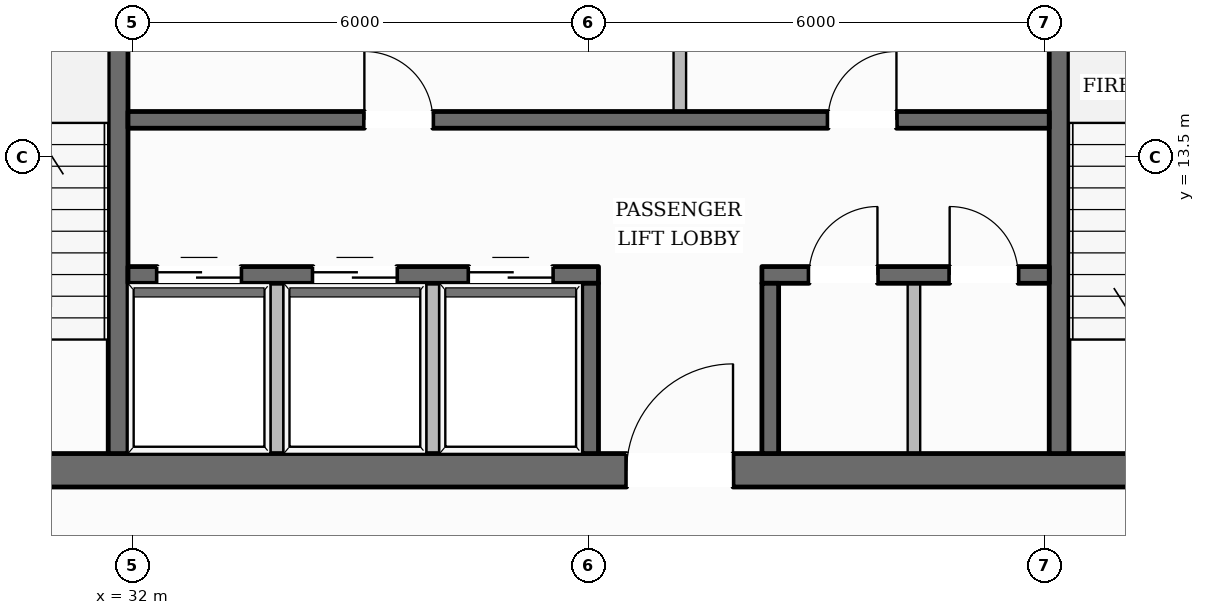
"""IFC4 building model, lengths in metres.
Left out: names, types, materials, properties, quantities, classifications, styles, units other than length and angle.
Written with IfcOpenShell. Run it as: python <this file> out.ifc"""

import sys

from ifc_helpers import new_model, si_unit, direction, frame, frame_2d, origin, place, context, subcontext, project, spatial, rectangle, extrude, element, fill, save


model = new_model("IFC4")
c1 = context("Model", 3, precision=1e-05, world=origin(), true_north=direction((0.0, 1.0)))
c2 = subcontext(c1, "Body", "Model", "MODEL_VIEW")
j1 = project(units=[si_unit("LENGTHUNIT", "METRE"), si_unit("PLANEANGLEUNIT", "RADIAN")], contexts=[c1])
p1 = place(None, origin())
s1 = spatial("IfcSite", under=j1, at=p1, CompositionType="ELEMENT")
p2 = place(p1, origin())
s2 = spatial("IfcBuilding", under=s1, at=p2, CompositionType="ELEMENT")
p3 = place(p2, frame((0.0, 0.0, 211.2)))
s3 = spatial("IfcBuildingStorey", under=s2, at=p3, CompositionType="ELEMENT", Elevation=211.2)
p4 = place(p3, frame((28.04, 9.38, 0.0), z_axis=(0.0, 0.0, 1.0), x_axis=(1.0, 0.0, 0.0)))
e1 = element("IfcWall", 1, at=p4, inside=s3, PredefinedType="SOLIDWALL", context=c2, shape_type="SweptSolid", body=[
    extrude(rectangle(XDim=19.92, YDim=0.44, at=frame_2d((9.96, 0.0))), origin(), (0.0, 0.0, 1.0), 3.6),
])
p5 = place(p4, frame((10.46, 0.0, 0.0)))
e2 = element("IfcOpeningElement", 2, at=p5, cuts=e1, PredefinedType="OPENING", context=c2, shape_type="SweptSolid", body=[
    extrude(rectangle(XDim=1.4, YDim=2.2, at=frame_2d((0.7, 1.1))), frame((0.0, 0.23, 0.0), z_axis=(0.0, -1.0, 0.0), x_axis=(1.0, 0.0, 0.0)), (0.0, 0.0, 1.0), 0.46),
])
p6 = place(p3, frame((31.81, 9.6, 0.0), z_axis=(0.0, 0.0, 1.0), x_axis=(0.0, 1.0, 0.0)))
e3 = element("IfcWall", 3, at=p6, inside=s3, PredefinedType="SHEAR", context=c2, shape_type="SweptSolid", body=[
    extrude(rectangle(XDim=13.0, YDim=0.26, at=frame_2d((6.5, 0.0))), origin(), (0.0, 0.0, 1.0), 3.6),
])
p7 = place(p6, frame((10.925, 0.0, 0.0)))
e4 = element("IfcOpeningElement", 4, at=p7, cuts=e3, PredefinedType="OPENING", context=c2, shape_type="SweptSolid", body=[
    extrude(rectangle(XDim=1.25, YDim=2.25, at=frame_2d((0.625, 1.125))), frame((0.0, 0.14, 0.0), z_axis=(0.0, -1.0, 0.0), x_axis=(1.0, 0.0, 0.0)), (0.0, 0.0, 1.0), 0.28),
])
p8 = place(p3, frame((44.19, 9.6, 0.0), z_axis=(0.0, 0.0, 1.0), x_axis=(0.0, 1.0, 0.0)))
e5 = element("IfcWall", 5, at=p8, inside=s3, PredefinedType="SHEAR", context=c2, shape_type="SweptSolid", body=[
    extrude(rectangle(XDim=13.0, YDim=0.26, at=frame_2d((6.5, 0.0))), origin(), (0.0, 0.0, 1.0), 3.6),
])
p9 = place(p8, frame((10.925, 0.0, 0.0)))
e6 = element("IfcOpeningElement", 6, at=p9, cuts=e5, PredefinedType="OPENING", context=c2, shape_type="SweptSolid", body=[
    extrude(rectangle(XDim=1.25, YDim=2.25, at=frame_2d((0.625, 1.125))), frame((0.0, 0.14, 0.0), z_axis=(0.0, -1.0, 0.0), x_axis=(1.0, 0.0, 0.0)), (0.0, 0.0, 1.0), 0.28),
])
p10 = place(p3, frame((31.94, 13.99, 0.0), z_axis=(0.0, 0.0, 1.0), x_axis=(1.0, 0.0, 0.0)))
e7 = element("IfcWall", 7, at=p10, inside=s3, PredefinedType="SOLIDWALL", context=c2, shape_type="SweptSolid", body=[
    extrude(rectangle(XDim=12.12, YDim=0.22, at=frame_2d((6.06, 0.0))), origin(), (0.0, 0.0, 1.0), 3.6),
])
p11 = place(p10, frame((3.11, 0.0, 0.0)))
e8 = element("IfcOpeningElement", 8, at=p11, cuts=e7, PredefinedType="OPENING", context=c2, shape_type="SweptSolid", body=[
    extrude(rectangle(XDim=0.9, YDim=2.1, at=frame_2d((0.45, 1.05))), frame((0.0, 0.12, 0.0), z_axis=(0.0, -1.0, 0.0), x_axis=(1.0, 0.0, 0.0)), (0.0, 0.0, 1.0), 0.24),
])
p12 = place(p10, frame((9.21, 0.0, 0.0)))
e9 = element("IfcOpeningElement", 9, at=p12, cuts=e7, PredefinedType="OPENING", context=c2, shape_type="SweptSolid", body=[
    extrude(rectangle(XDim=0.9, YDim=2.1, at=frame_2d((0.45, 1.05))), frame((0.0, 0.12, 0.0), z_axis=(0.0, -1.0, 0.0), x_axis=(1.0, 0.0, 0.0)), (0.0, 0.0, 1.0), 0.24),
])
p13 = place(p3, frame((31.94, 11.95, 0.0), z_axis=(0.0, 0.0, 1.0), x_axis=(1.0, 0.0, 0.0)))
e10 = element("IfcWall", 10, at=p13, inside=s3, PredefinedType="SOLIDWALL", context=c2, shape_type="SweptSolid", body=[
    extrude(rectangle(XDim=6.19, YDim=0.22, at=frame_2d((3.095, 0.0))), origin(), (0.0, 0.0, 1.0), 3.6),
])
p14 = place(p13, frame((0.385, 0.0, 0.0)))
e11 = element("IfcOpeningElement", 11, at=p14, cuts=e10, PredefinedType="OPENING", context=c2, shape_type="SweptSolid", body=[
    extrude(rectangle(XDim=1.1, YDim=2.2, at=frame_2d((0.55, 1.1))), frame((0.0, 0.12, 0.0), z_axis=(0.0, -1.0, 0.0), x_axis=(1.0, 0.0, 0.0)), (0.0, 0.0, 1.0), 0.24),
])
p15 = place(p13, frame((2.435, 0.0, 0.0)))
e12 = element("IfcOpeningElement", 12, at=p15, cuts=e10, PredefinedType="OPENING", context=c2, shape_type="SweptSolid", body=[
    extrude(rectangle(XDim=1.1, YDim=2.2, at=frame_2d((0.55, 1.1))), frame((0.0, 0.12, 0.0), z_axis=(0.0, -1.0, 0.0), x_axis=(1.0, 0.0, 0.0)), (0.0, 0.0, 1.0), 0.24),
])
p16 = place(p13, frame((4.485, 0.0, 0.0)))
e13 = element("IfcOpeningElement", 13, at=p16, cuts=e10, PredefinedType="OPENING", context=c2, shape_type="SweptSolid", body=[
    extrude(rectangle(XDim=1.1, YDim=2.2, at=frame_2d((0.55, 1.1))), frame((0.0, 0.12, 0.0), z_axis=(0.0, -1.0, 0.0), x_axis=(1.0, 0.0, 0.0)), (0.0, 0.0, 1.0), 0.24),
])
p17 = place(p3, frame((40.28, 11.95, 0.0), z_axis=(0.0, 0.0, 1.0), x_axis=(1.0, 0.0, 0.0)))
e14 = element("IfcWall", 14, at=p17, inside=s3, PredefinedType="SOLIDWALL", context=c2, shape_type="SweptSolid", body=[
    extrude(rectangle(XDim=3.78, YDim=0.22, at=frame_2d((1.89, 0.0))), origin(), (0.0, 0.0, 1.0), 3.6),
])
p18 = place(p17, frame((0.62, 0.0, 0.0)))
e15 = element("IfcOpeningElement", 15, at=p18, cuts=e14, PredefinedType="OPENING", context=c2, shape_type="SweptSolid", body=[
    extrude(rectangle(XDim=0.9, YDim=2.1, at=frame_2d((0.45, 1.05))), frame((0.0, 0.12, 0.0), z_axis=(0.0, -1.0, 0.0), x_axis=(1.0, 0.0, 0.0)), (0.0, 0.0, 1.0), 0.24),
])
p19 = place(p17, frame((2.47, 0.0, 0.0)))
e16 = element("IfcOpeningElement", 16, at=p19, cuts=e14, PredefinedType="OPENING", context=c2, shape_type="SweptSolid", body=[
    extrude(rectangle(XDim=0.9, YDim=2.1, at=frame_2d((0.45, 1.05))), frame((0.0, 0.12, 0.0), z_axis=(0.0, -1.0, 0.0), x_axis=(1.0, 0.0, 0.0)), (0.0, 0.0, 1.0), 0.24),
])
for number, where, z_axis, x_axis in (
    (17, (38.02, 9.6, 0.0), (0.0, 0.0, 1.0), (0.0, 1.0, 0.0)),
    (18, (40.39, 9.6, 0.0), (0.0, 0.0, 1.0), (0.0, 1.0, 0.0)),
):
    element("IfcWall", number, at=place(p3, frame(where, z_axis=z_axis, x_axis=x_axis)), inside=s3, PredefinedType="SOLIDWALL", context=c2, shape_type="SweptSolid", body=[
        extrude(rectangle(XDim=2.24, YDim=0.22, at=frame_2d((1.12, 0.0))), origin(), (0.0, 0.0, 1.0), 3.6),
    ])
p20 = place(p3, frame((14.16, 10.888, 0.0), z_axis=(0.0, 0.0, 1.0), x_axis=(0.508058913236, 0.861322321017, 0.0)))
e19 = element("IfcWall", 19, at=p20, inside=s3, PredefinedType="STANDARD", context=c2, shape_type="SweptSolid", body=[
    extrude(rectangle(XDim=38.718, YDim=0.35, at=frame_2d((19.359, 0.0))), origin(), (0.0, 0.0, 1.0), 3.132),
])
p21 = place(p20, frame((34.374, 0.0, 0.65)))
e20 = element("IfcOpeningElement", 20, at=p21, cuts=e19, PredefinedType="OPENING", context=c2, shape_type="SweptSolid", body=[
    extrude(rectangle(XDim=1.45, YDim=1.75, at=frame_2d((0.725, 0.875))), frame((0.0, 0.185, 0.0), z_axis=(0.0, -1.0, 0.0), x_axis=(1.0, 0.0, 0.0)), (0.0, 0.0, 1.0), 0.37),
])
p22 = place(p20, frame((28.08, 0.0, 0.65)))
e21 = element("IfcOpeningElement", 21, at=p22, cuts=e19, PredefinedType="OPENING", context=c2, shape_type="SweptSolid", body=[
    extrude(rectangle(XDim=1.45, YDim=1.75, at=frame_2d((0.725, 0.875))), frame((0.0, 0.185, 0.0), z_axis=(0.0, -1.0, 0.0), x_axis=(1.0, 0.0, 0.0)), (0.0, 0.0, 1.0), 0.37),
])
p23 = place(p20, frame((15.491, 0.0, 0.65)))
e22 = element("IfcOpeningElement", 22, at=p23, cuts=e19, PredefinedType="OPENING", context=c2, shape_type="SweptSolid", body=[
    extrude(rectangle(XDim=1.45, YDim=1.75, at=frame_2d((0.725, 0.875))), frame((0.0, 0.185, 0.0), z_axis=(0.0, -1.0, 0.0), x_axis=(1.0, 0.0, 0.0)), (0.0, 0.0, 1.0), 0.37),
])
p24 = place(p20, frame((9.197, 0.0, 0.65)))
e23 = element("IfcOpeningElement", 23, at=p24, cuts=e19, PredefinedType="OPENING", context=c2, shape_type="SweptSolid", body=[
    extrude(rectangle(XDim=1.45, YDim=1.75, at=frame_2d((0.725, 0.875))), frame((0.0, 0.185, 0.0), z_axis=(0.0, -1.0, 0.0), x_axis=(1.0, 0.0, 0.0)), (0.0, 0.0, 1.0), 0.37),
])
p25 = place(p20, frame((2.903, 0.0, 0.65)))
e24 = element("IfcOpeningElement", 24, at=p25, cuts=e19, PredefinedType="OPENING", context=c2, shape_type="SweptSolid", body=[
    extrude(rectangle(XDim=1.45, YDim=1.75, at=frame_2d((0.725, 0.875))), frame((0.0, 0.185, 0.0), z_axis=(0.0, -1.0, 0.0), x_axis=(1.0, 0.0, 0.0)), (0.0, 0.0, 1.0), 0.37),
])
p26 = place(p3, frame((42.066, 44.299, 0.0), z_axis=(0.0, 0.0, 1.0), x_axis=(0.502188775534, -0.864758020331, 0.0)))
e25 = element("IfcWall", 25, at=p26, inside=s3, PredefinedType="STANDARD", context=c2, shape_type="SweptSolid", body=[
    extrude(rectangle(XDim=38.263, YDim=0.35, at=frame_2d((19.132, 0.0))), origin(), (0.0, 0.0, 1.0), 3.132),
])
p27 = place(p26, frame((33.948, 0.0, 0.65)))
e26 = element("IfcOpeningElement", 26, at=p27, cuts=e25, PredefinedType="OPENING", context=c2, shape_type="SweptSolid", body=[
    extrude(rectangle(XDim=1.45, YDim=1.75, at=frame_2d((0.725, 0.875))), frame((0.0, 0.185, 0.0), z_axis=(0.0, -1.0, 0.0), x_axis=(1.0, 0.0, 0.0)), (0.0, 0.0, 1.0), 0.37),
])
p28 = place(p26, frame((27.731, 0.0, 0.65)))
e27 = element("IfcOpeningElement", 27, at=p28, cuts=e25, PredefinedType="OPENING", context=c2, shape_type="SweptSolid", body=[
    extrude(rectangle(XDim=1.45, YDim=1.75, at=frame_2d((0.725, 0.875))), frame((0.0, 0.185, 0.0), z_axis=(0.0, -1.0, 0.0), x_axis=(1.0, 0.0, 0.0)), (0.0, 0.0, 1.0), 0.37),
])
p29 = place(p26, frame((15.297, 0.0, 0.65)))
e28 = element("IfcOpeningElement", 28, at=p29, cuts=e25, PredefinedType="OPENING", context=c2, shape_type="SweptSolid", body=[
    extrude(rectangle(XDim=1.45, YDim=1.75, at=frame_2d((0.725, 0.875))), frame((0.0, 0.185, 0.0), z_axis=(0.0, -1.0, 0.0), x_axis=(1.0, 0.0, 0.0)), (0.0, 0.0, 1.0), 0.37),
])
p30 = place(p26, frame((9.079, 0.0, 0.65)))
e29 = element("IfcOpeningElement", 29, at=p30, cuts=e25, PredefinedType="OPENING", context=c2, shape_type="SweptSolid", body=[
    extrude(rectangle(XDim=1.45, YDim=1.75, at=frame_2d((0.725, 0.875))), frame((0.0, 0.185, 0.0), z_axis=(0.0, -1.0, 0.0), x_axis=(1.0, 0.0, 0.0)), (0.0, 0.0, 1.0), 0.37),
])
p31 = place(p26, frame((2.862, 0.0, 0.65)))
e30 = element("IfcOpeningElement", 30, at=p31, cuts=e25, PredefinedType="OPENING", context=c2, shape_type="SweptSolid", body=[
    extrude(rectangle(XDim=1.45, YDim=1.75, at=frame_2d((0.725, 0.875))), frame((0.0, 0.185, 0.0), z_axis=(0.0, -1.0, 0.0), x_axis=(1.0, 0.0, 0.0)), (0.0, 0.0, 1.0), 0.37),
])
for number, where, z_axis, x_axis in (
    (31, (33.9, 9.52, 0.0), (0.0, 0.0, 1.0), (0.0, 1.0, 0.0)),
    (32, (35.95, 9.52, 0.0), (0.0, 0.0, 1.0), (0.0, 1.0, 0.0)),
):
    element("IfcWall", number, at=place(p3, frame(where, z_axis=z_axis, x_axis=x_axis)), inside=s3, PredefinedType="PARTITIONING", context=c2, shape_type="SweptSolid", body=[
        extrude(rectangle(XDim=2.32, YDim=0.165, at=frame_2d((1.16, 0.0))), origin(), (0.0, 0.0, 1.0), 3.6),
    ])
p32 = place(p3, frame((39.2, 14.1, 0.0), z_axis=(0.0, 0.0, 1.0), x_axis=(0.0, 1.0, 0.0)))
e33 = element("IfcWall", 33, at=p32, inside=s3, PredefinedType="PARTITIONING", context=c2, shape_type="SweptSolid", body=[
    extrude(rectangle(XDim=2.24, YDim=0.165, at=frame_2d((1.12, 0.0))), origin(), (0.0, 0.0, 1.0), 3.6),
])
p33 = place(p3, frame((42.28, 9.52, 0.0), z_axis=(0.0, 0.0, 1.0), x_axis=(0.0, 1.0, 0.0)))
e34 = element("IfcWall", 34, at=p33, inside=s3, PredefinedType="PARTITIONING", context=c2, shape_type="SweptSolid", body=[
    extrude(rectangle(XDim=2.32, YDim=0.165, at=frame_2d((1.16, 0.0))), origin(), (0.0, 0.0, 1.0), 3.6),
])
p34 = place(p5, origin())
e35 = element("IfcDoor", 35, at=p34, inside=s3, OperationType="SINGLE_SWING_RIGHT", PredefinedType="DOOR", context=c2, shape_type="SweptSolid", body=[
    extrude(rectangle(XDim=1.4, YDim=2.2, at=frame_2d((0.7, 1.1))), frame((0.0, 0.025, 0.0), z_axis=(0.0, -1.0, 0.0), x_axis=(1.0, 0.0, 0.0)), (0.0, 0.0, 1.0), 0.05),
])
fill(e2, e35)
p35 = place(p14, origin())
e36 = element("IfcDoor", 36, at=p35, inside=s3, OperationType="DOUBLE_DOOR_SLIDING", PredefinedType="DOOR", context=c2, shape_type="SweptSolid", body=[
    extrude(rectangle(XDim=1.1, YDim=2.2, at=frame_2d((0.55, 1.1))), frame((0.0, 0.025, 0.0), z_axis=(0.0, -1.0, 0.0), x_axis=(1.0, 0.0, 0.0)), (0.0, 0.0, 1.0), 0.05),
])
fill(e11, e36)
p36 = place(p15, origin())
e37 = element("IfcDoor", 37, at=p36, inside=s3, OperationType="DOUBLE_DOOR_SLIDING", PredefinedType="DOOR", context=c2, shape_type="SweptSolid", body=[
    extrude(rectangle(XDim=1.1, YDim=2.2, at=frame_2d((0.55, 1.1))), frame((0.0, 0.025, 0.0), z_axis=(0.0, -1.0, 0.0), x_axis=(1.0, 0.0, 0.0)), (0.0, 0.0, 1.0), 0.05),
])
fill(e12, e37)
p37 = place(p16, origin())
e38 = element("IfcDoor", 38, at=p37, inside=s3, OperationType="DOUBLE_DOOR_SLIDING", PredefinedType="DOOR", context=c2, shape_type="SweptSolid", body=[
    extrude(rectangle(XDim=1.1, YDim=2.2, at=frame_2d((0.55, 1.1))), frame((0.0, 0.025, 0.0), z_axis=(0.0, -1.0, 0.0), x_axis=(1.0, 0.0, 0.0)), (0.0, 0.0, 1.0), 0.05),
])
fill(e13, e38)
p38 = place(p11, origin())
e39 = element("IfcDoor", 39, at=p38, inside=s3, OperationType="SINGLE_SWING_LEFT", PredefinedType="DOOR", context=c2, shape_type="SweptSolid", body=[
    extrude(rectangle(XDim=0.9, YDim=2.1, at=frame_2d((0.45, 1.05))), frame((0.0, 0.025, 0.0), z_axis=(0.0, -1.0, 0.0), x_axis=(1.0, 0.0, 0.0)), (0.0, 0.0, 1.0), 0.05),
])
fill(e8, e39)
p39 = place(p12, origin())
e40 = element("IfcDoor", 40, at=p39, inside=s3, OperationType="SINGLE_SWING_RIGHT", PredefinedType="DOOR", context=c2, shape_type="SweptSolid", body=[
    extrude(rectangle(XDim=0.9, YDim=2.1, at=frame_2d((0.45, 1.05))), frame((0.0, 0.025, 0.0), z_axis=(0.0, -1.0, 0.0), x_axis=(1.0, 0.0, 0.0)), (0.0, 0.0, 1.0), 0.05),
])
fill(e9, e40)
p40 = place(p18, origin())
e41 = element("IfcDoor", 41, at=p40, inside=s3, OperationType="SINGLE_SWING_RIGHT", PredefinedType="DOOR", context=c2, shape_type="SweptSolid", body=[
    extrude(rectangle(XDim=0.9, YDim=2.1, at=frame_2d((0.45, 1.05))), frame((0.0, 0.025, 0.0), z_axis=(0.0, -1.0, 0.0), x_axis=(1.0, 0.0, 0.0)), (0.0, 0.0, 1.0), 0.05),
])
fill(e15, e41)
p41 = place(p19, origin())
e42 = element("IfcDoor", 42, at=p41, inside=s3, OperationType="SINGLE_SWING_LEFT", PredefinedType="DOOR", context=c2, shape_type="SweptSolid", body=[
    extrude(rectangle(XDim=0.9, YDim=2.1, at=frame_2d((0.45, 1.05))), frame((0.0, 0.025, 0.0), z_axis=(0.0, -1.0, 0.0), x_axis=(1.0, 0.0, 0.0)), (0.0, 0.0, 1.0), 0.05),
])
fill(e16, e42)
save(model, sys.argv[1])
